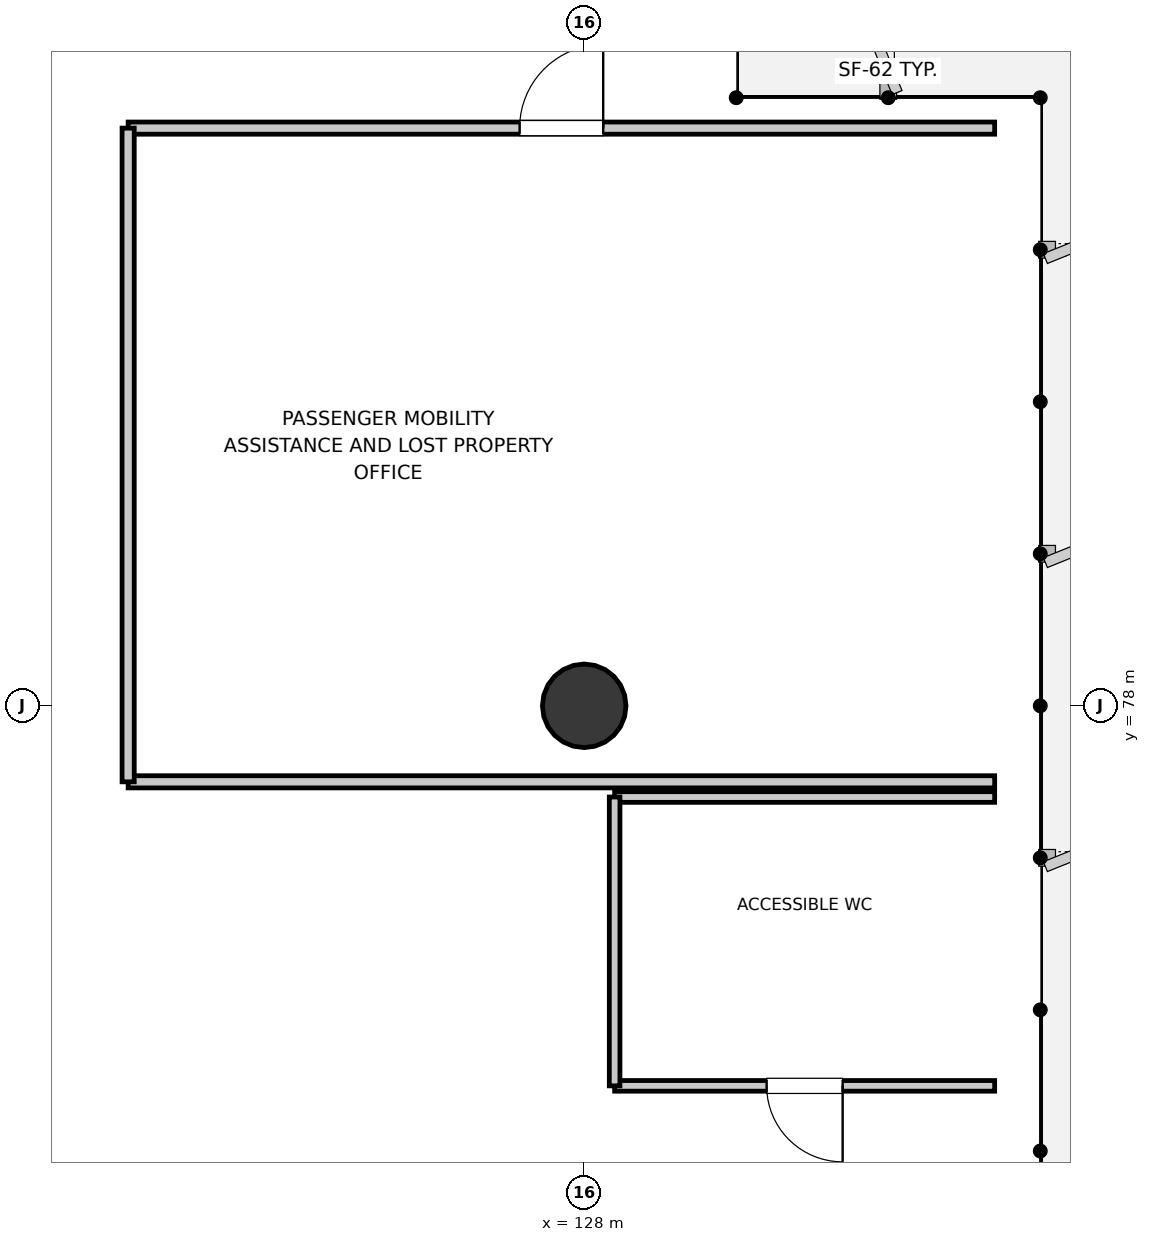
"""IFC4 building model, lengths in metres.
Left out: names, types, materials, properties, quantities, classifications, styles, units other than length and angle.
Written with IfcOpenShell. Run it as: python <this file> out.ifc"""

import sys

from ifc_helpers import new_model, si_unit, direction, frame, frame_2d, origin, origin_2d, place, context, subcontext, project, spatial, rectangle, circle, extrude, element, fill, save


model = new_model("IFC4")
c1 = context("Model", 3, precision=1e-05, world=origin(), true_north=direction((0.0, 1.0)))
c2 = subcontext(c1, "Body", "Model", "MODEL_VIEW")
j1 = project(units=[si_unit("LENGTHUNIT", "METRE"), si_unit("PLANEANGLEUNIT", "RADIAN")], contexts=[c1])
p1 = place(None, origin())
s1 = spatial("IfcSite", under=j1, at=p1, CompositionType="ELEMENT")
p2 = place(p1, origin())
s2 = spatial("IfcBuilding", under=s1, at=p2, CompositionType="ELEMENT")
p3 = place(p2, origin())
s3 = spatial("IfcBuildingStorey", under=s2, at=p3, CompositionType="ELEMENT", Elevation=0.0)
p4 = place(p3, frame((128.0, 78.0, 0.0), z_axis=(0.0, 0.0, 1.0), x_axis=(1.0, 0.0, 0.0)))
e1 = element("IfcColumn", 1, at=p4, inside=s3, PredefinedType="COLUMN", context=c2, shape_type="SweptSolid", body=[
    extrude(circle(Radius=0.55, at=origin_2d()), origin(), (0.0, 0.0, 1.0), 6.0),
])
p5 = place(p3, frame((128.4, 76.8, 0.0), z_axis=(0.0, 0.0, 1.0), x_axis=(1.0, 0.0, 0.0)))
e2 = element("IfcWall", 2, at=p5, inside=s3, PredefinedType="PARTITIONING", context=c2, shape_type="SweptSolid", body=[
    extrude(rectangle(XDim=5.0, YDim=0.14, at=frame_2d((2.5, 0.0))), origin(), (0.0, 0.0, 1.0), 5.62),
])
p6 = place(p3, frame((133.4, 73.0, 0.0), z_axis=(0.0, 0.0, 1.0), x_axis=(-1.0, 0.0, 0.0)))
e3 = element("IfcWall", 3, at=p6, inside=s3, PredefinedType="PARTITIONING", context=c2, shape_type="SweptSolid", body=[
    extrude(rectangle(XDim=5.0, YDim=0.14, at=frame_2d((2.5, 0.0))), origin(), (0.0, 0.0, 1.0), 5.62),
])
p7 = place(p6, frame((2.0, 0.0, 0.0)))
e4 = element("IfcOpeningElement", 4, at=p7, cuts=e3, PredefinedType="OPENING", context=c2, shape_type="SweptSolid", body=[
    extrude(rectangle(XDim=1.0, YDim=2.15, at=frame_2d((0.5, 1.075))), frame((0.0, 0.08, 0.0), z_axis=(0.0, -1.0, 0.0), x_axis=(1.0, 0.0, 0.0)), (0.0, 0.0, 1.0), 0.16),
])
p8 = place(p3, frame((128.4, 73.0, 0.0), z_axis=(0.0, 0.0, 1.0), x_axis=(0.0, 1.0, 0.0)))
e5 = element("IfcWall", 5, at=p8, inside=s3, PredefinedType="PARTITIONING", context=c2, shape_type="SweptSolid", body=[
    extrude(rectangle(XDim=3.8, YDim=0.14, at=frame_2d((1.9, 0.0))), origin(), (0.0, 0.0, 1.0), 5.345),
])
p9 = place(p3, frame((122.0, 85.6, 0.0), z_axis=(0.0, 0.0, 1.0), x_axis=(1.0, 0.0, 0.0)))
e6 = element("IfcWall", 6, at=p9, inside=s3, PredefinedType="PARTITIONING", context=c2, shape_type="SweptSolid", body=[
    extrude(rectangle(XDim=11.4, YDim=0.16, at=frame_2d((5.7, 0.0))), origin(), (0.0, 0.0, 1.0), 4.665),
])
p10 = place(p9, frame((5.15, 0.0, 0.0)))
e7 = element("IfcOpeningElement", 7, at=p10, cuts=e6, PredefinedType="OPENING", context=c2, shape_type="SweptSolid", body=[
    extrude(rectangle(XDim=1.1, YDim=2.2, at=frame_2d((0.55, 1.1))), frame((0.0, 0.09, 0.0), z_axis=(0.0, -1.0, 0.0), x_axis=(1.0, 0.0, 0.0)), (0.0, 0.0, 1.0), 0.18),
])
p11 = place(p3, frame((133.4, 77.0, 0.0), z_axis=(0.0, 0.0, 1.0), x_axis=(-1.0, 0.0, 0.0)))
e8 = element("IfcWall", 8, at=p11, inside=s3, PredefinedType="PARTITIONING", context=c2, shape_type="SweptSolid", body=[
    extrude(rectangle(XDim=11.4, YDim=0.16, at=frame_2d((5.7, 0.0))), origin(), (0.0, 0.0, 1.0), 5.065),
])
p12 = place(p3, frame((122.0, 77.0, 0.0), z_axis=(0.0, 0.0, 1.0), x_axis=(0.0, 1.0, 0.0)))
e9 = element("IfcWall", 9, at=p12, inside=s3, PredefinedType="PARTITIONING", context=c2, shape_type="SweptSolid", body=[
    extrude(rectangle(XDim=8.6, YDim=0.16, at=frame_2d((4.3, 0.0))), origin(), (0.0, 0.0, 1.0), 4.265),
])
p13 = place(p7, origin())
e10 = element("IfcDoor", 10, at=p13, inside=s3, OperationType="SINGLE_SWING_LEFT", PredefinedType="DOOR", context=c2, shape_type="SweptSolid", body=[
    extrude(rectangle(XDim=1.0, YDim=2.15, at=frame_2d((0.5, 1.075))), frame((0.0, 0.025, 0.0), z_axis=(0.0, -1.0, 0.0), x_axis=(1.0, 0.0, 0.0)), (0.0, 0.0, 1.0), 0.05),
])
fill(e4, e10)
p14 = place(p10, origin())
e11 = element("IfcDoor", 11, at=p14, inside=s3, OperationType="SINGLE_SWING_RIGHT", PredefinedType="DOOR", context=c2, shape_type="SweptSolid", body=[
    extrude(rectangle(XDim=1.1, YDim=2.2, at=frame_2d((0.55, 1.1))), frame((0.0, 0.025, 0.0), z_axis=(0.0, -1.0, 0.0), x_axis=(1.0, 0.0, 0.0)), (0.0, 0.0, 1.0), 0.05),
])
fill(e7, e11)
save(model, sys.argv[1])
